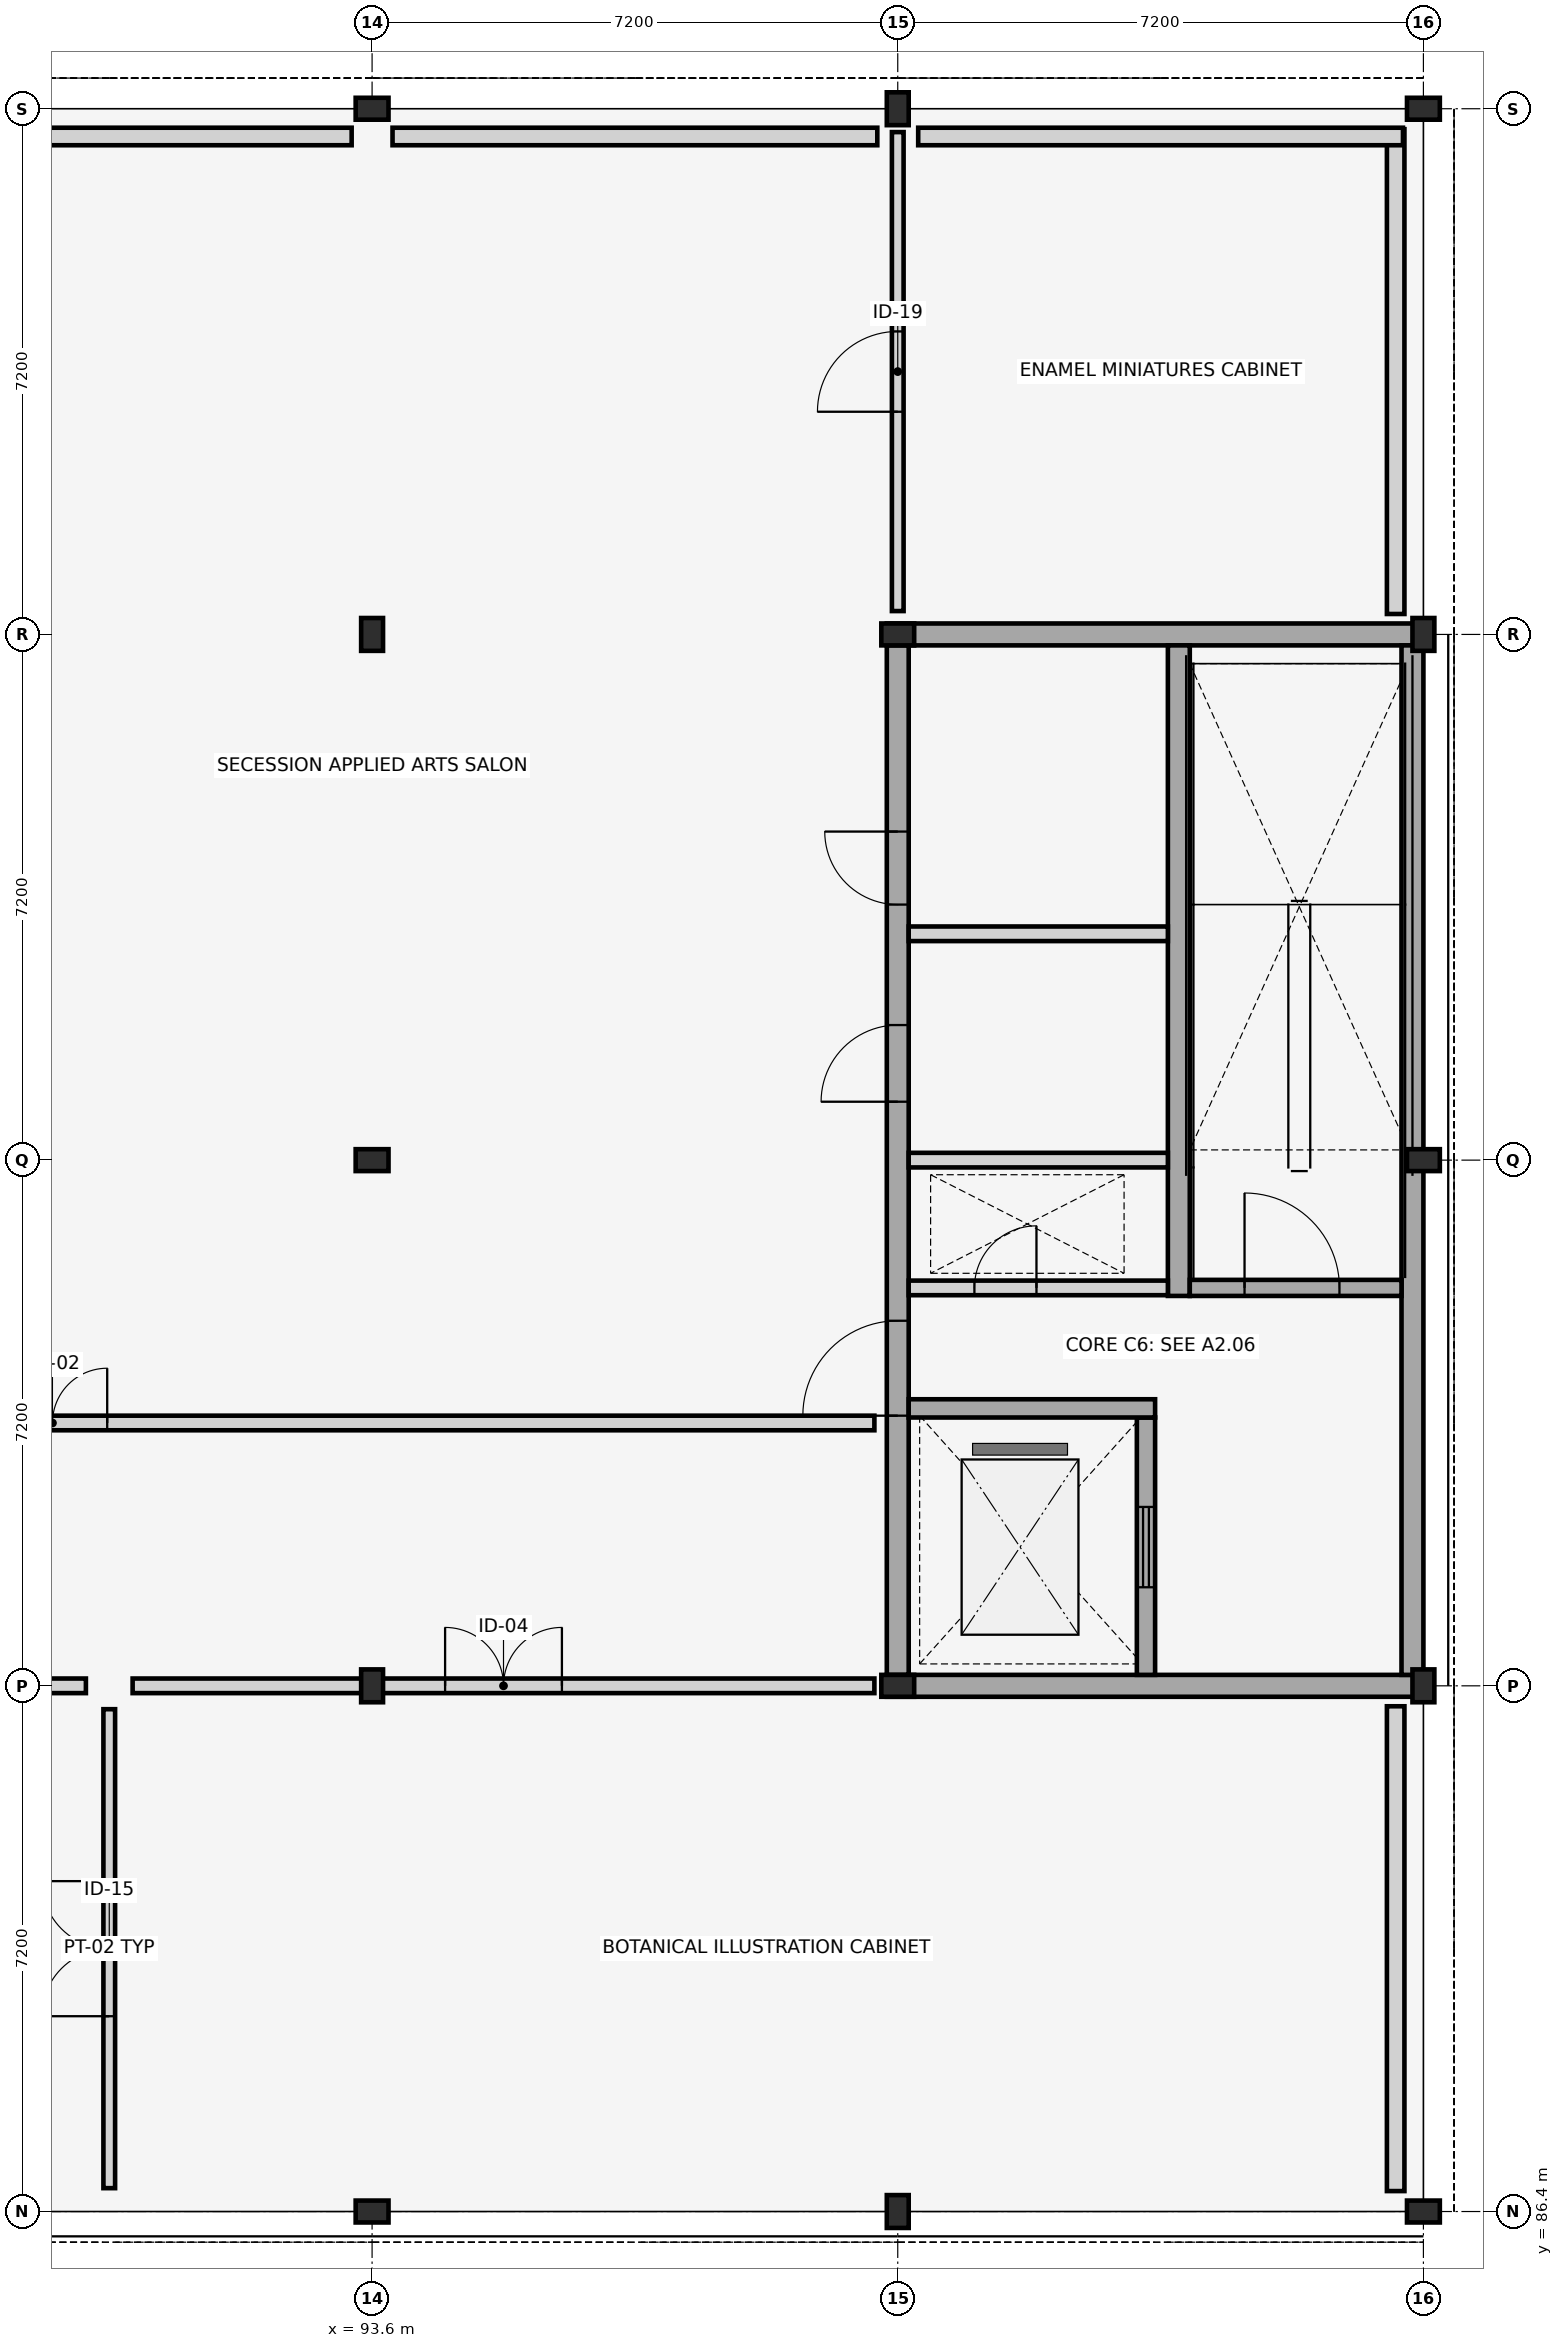
"""IFC4 building model, lengths in metres.
Left out: names, types, materials, properties, quantities, classifications, styles, units other than length and angle.
Written with IfcOpenShell. Run it as: python <this file> out.ifc"""

import sys

from ifc_helpers import new_model, si_unit, direction, frame, frame_2d, origin, origin_2d, place, context, subcontext, project, spatial, rectangle, i_section, extrude, element, fill, save


model = new_model("IFC4")
c1 = context("Model", 3, precision=1e-05, world=origin(), true_north=direction((0.0, 1.0)))
c2 = subcontext(c1, "Body", "Model", "MODEL_VIEW")
j1 = project(units=[si_unit("LENGTHUNIT", "METRE"), si_unit("PLANEANGLEUNIT", "RADIAN")], contexts=[c1])
p1 = place(None, origin())
s1 = spatial("IfcSite", under=j1, at=p1, CompositionType="ELEMENT")
p2 = place(p1, origin())
s2 = spatial("IfcBuilding", under=s1, at=p2, CompositionType="ELEMENT")
p3 = place(p2, frame((0.0, 0.0, 4.5)))
s3 = spatial("IfcBuildingStorey", under=s2, at=p3, CompositionType="ELEMENT", Elevation=4.5)
for number, where, z_axis, x_axis in (
    (1, (93.6, 86.4, 0.0), (0.0, 0.0, 1.0), (0.0, 1.0, 0.0)),
    (2, (93.6, 93.6, 0.0), (0.0, 0.0, 1.0), (1.0, 0.0, 0.0)),
    (3, (93.6, 100.8, 0.0), (0.0, 0.0, 1.0), (0.0, 1.0, 0.0)),
    (4, (93.6, 108.0, 0.0), (0.0, 0.0, 1.0), (1.0, 0.0, 0.0)),
    (5, (93.6, 115.2, 0.0), (0.0, 0.0, 1.0), (0.0, 1.0, 0.0)),
    (6, (100.8, 86.4, 0.0), (0.0, 0.0, 1.0), (1.0, 0.0, 0.0)),
    (7, (100.8, 93.6, 0.0), (0.0, 0.0, 1.0), (0.0, 1.0, 0.0)),
    (8, (100.8, 108.0, 0.0), (0.0, 0.0, 1.0), (0.0, 1.0, 0.0)),
    (9, (100.8, 115.2, 0.0), (0.0, 0.0, 1.0), (1.0, 0.0, 0.0)),
    (10, (108.0, 86.4, 0.0), (0.0, 0.0, 1.0), (0.0, 1.0, 0.0)),
    (11, (108.0, 93.6, 0.0), (0.0, 0.0, 1.0), (1.0, 0.0, 0.0)),
    (12, (108.0, 100.8, 0.0), (0.0, 0.0, 1.0), (0.0, 1.0, 0.0)),
    (13, (108.0, 108.0, 0.0), (0.0, 0.0, 1.0), (1.0, 0.0, 0.0)),
    (14, (108.0, 115.2, 0.0), (0.0, 0.0, 1.0), (0.0, 1.0, 0.0)),
):
    element("IfcColumn", number, at=place(p3, frame(where, z_axis=z_axis, x_axis=x_axis)), inside=s3, PredefinedType="COLUMN", context=c2, shape_type="SweptSolid", body=[
        extrude(i_section(OverallWidth=0.3, OverallDepth=0.45, WebThickness=0.014, FlangeThickness=0.026, FilletRadius=0.027, at=origin_2d()), origin(), (0.0, 0.0, 1.0), 4.2),
    ])
p4 = place(p3, frame((107.62, 86.68, 0.0), z_axis=(0.0, 0.0, 1.0), x_axis=(0.0, 1.0, 0.0)))
e15 = element("IfcWall", 15, at=p4, inside=s3, PredefinedType="STANDARD", context=c2, shape_type="SweptSolid", body=[
    extrude(rectangle(XDim=6.64, YDim=0.24, at=frame_2d((3.32, 0.0))), origin(), (0.0, 0.0, 1.0), 3.58),
])
for number, where, z_axis, x_axis in (
    (16, (107.62, 108.28, 0.0), (0.0, 0.0, 1.0), (0.0, 1.0, 0.0)),
    (17, (107.72, 114.82, 0.0), (0.0, 0.0, 1.0), (-1.0, 0.0, 0.0)),
):
    element("IfcWall", number, at=place(p3, frame(where, z_axis=z_axis, x_axis=x_axis)), inside=s3, PredefinedType="STANDARD", context=c2, shape_type="SweptSolid", body=[
        extrude(rectangle(XDim=6.64, YDim=0.24, at=frame_2d((3.32, 0.0))), origin(), (0.0, 0.0, 1.0), 3.58),
    ])
for number, where, z_axis, x_axis in (
    (18, (100.52, 114.82, 0.0), (0.0, 0.0, 1.0), (-1.0, 0.0, 0.0)),
    (19, (93.32, 114.82, 0.0), (0.0, 0.0, 1.0), (-1.0, 0.0, 0.0)),
):
    element("IfcWall", number, at=place(p3, frame(where, z_axis=z_axis, x_axis=x_axis)), inside=s3, PredefinedType="STANDARD", context=c2, shape_type="SweptSolid", body=[
        extrude(rectangle(XDim=6.64, YDim=0.24, at=frame_2d((3.32, 0.0))), origin(), (0.0, 0.0, 1.0), 3.58),
    ])
for number, where, z_axis, x_axis in (
    (20, (100.65, 93.6, 0.0), (0.0, 0.0, 1.0), (1.0, 0.0, 0.0)),
    (21, (100.65, 108.0, 0.0), (0.0, 0.0, 1.0), (1.0, 0.0, 0.0)),
):
    element("IfcWall", number, at=place(p3, frame(where, z_axis=z_axis, x_axis=x_axis)), inside=s3, PredefinedType="SHEAR", context=c2, shape_type="SweptSolid", body=[
        extrude(rectangle(XDim=7.35, YDim=0.3, at=frame_2d((3.675, 0.0))), origin(), (0.0, 0.0, 1.0), 3.98),
    ])
p5 = place(p3, frame((107.85, 93.75, 0.0), z_axis=(0.0, 0.0, 1.0), x_axis=(0.0, 1.0, 0.0)))
e22 = element("IfcWall", 22, at=p5, inside=s3, PredefinedType="SHEAR", context=c2, shape_type="SweptSolid", body=[
    extrude(rectangle(XDim=14.1, YDim=0.3, at=frame_2d((7.05, 0.0))), origin(), (0.0, 0.0, 1.0), 3.98),
])
p6 = place(p3, frame((100.8, 93.75, 0.0), z_axis=(0.0, 0.0, 1.0), x_axis=(0.0, 1.0, 0.0)))
e23 = element("IfcWall", 23, at=p6, inside=s3, PredefinedType="SHEAR", context=c2, shape_type="SweptSolid", body=[
    extrude(rectangle(XDim=14.1, YDim=0.3, at=frame_2d((7.05, 0.0))), origin(), (0.0, 0.0, 1.0), 3.98),
])
p7 = place(p6, frame((3.55, 0.0, 0.0)))
e24 = element("IfcOpeningElement", 24, at=p7, cuts=e23, PredefinedType="OPENING", context=c2, shape_type="SweptSolid", body=[
    extrude(rectangle(XDim=1.3, YDim=2.2, at=frame_2d((0.65, 1.1))), frame((0.0, 0.16, 0.0), z_axis=(0.0, -1.0, 0.0), x_axis=(1.0, 0.0, 0.0)), (0.0, 0.0, 1.0), 0.32),
])
p8 = place(p6, frame((7.85, 0.0, 0.0)))
e25 = element("IfcOpeningElement", 25, at=p8, cuts=e23, PredefinedType="OPENING", context=c2, shape_type="SweptSolid", body=[
    extrude(rectangle(XDim=1.05, YDim=2.15, at=frame_2d((0.525, 1.075))), frame((0.0, 0.16, 0.0), z_axis=(0.0, -1.0, 0.0), x_axis=(1.0, 0.0, 0.0)), (0.0, 0.0, 1.0), 0.32),
])
p9 = place(p6, frame((10.55, 0.0, 0.0)))
e26 = element("IfcOpeningElement", 26, at=p9, cuts=e23, PredefinedType="OPENING", context=c2, shape_type="SweptSolid", body=[
    extrude(rectangle(XDim=1.0, YDim=2.15, at=frame_2d((0.5, 1.075))), frame((0.0, 0.16, 0.0), z_axis=(0.0, -1.0, 0.0), x_axis=(1.0, 0.0, 0.0)), (0.0, 0.0, 1.0), 0.32),
])
p10 = place(p3, frame((104.2, 93.75, 0.0), z_axis=(0.0, 0.0, 1.0), x_axis=(0.0, 1.0, 0.0)))
e27 = element("IfcWall", 27, at=p10, inside=s3, PredefinedType="SHEAR", context=c2, shape_type="SweptSolid", body=[
    extrude(rectangle(XDim=3.525, YDim=0.25, at=frame_2d((1.762, 0.0))), origin(), (0.0, 0.0, 1.0), 3.98),
])
p11 = place(p10, frame((1.2, 0.0, 0.0)))
e28 = element("IfcOpeningElement", 28, at=p11, cuts=e27, PredefinedType="OPENING", context=c2, shape_type="SweptSolid", body=[
    extrude(rectangle(XDim=1.1, YDim=2.15, at=frame_2d((0.55, 1.075))), frame((0.0, 0.135, 0.0), z_axis=(0.0, -1.0, 0.0), x_axis=(1.0, 0.0, 0.0)), (0.0, 0.0, 1.0), 0.27),
])
p12 = place(p3, frame((104.65, 98.94, 0.0), z_axis=(0.0, 0.0, 1.0), x_axis=(0.0, 1.0, 0.0)))
e29 = element("IfcWall", 29, at=p12, inside=s3, PredefinedType="SHEAR", context=c2, shape_type="SweptSolid", body=[
    extrude(rectangle(XDim=8.91, YDim=0.3, at=frame_2d((4.455, 0.0))), origin(), (0.0, 0.0, 1.0), 3.98),
])
p13 = place(p3, frame((100.95, 99.05, 0.0), z_axis=(0.0, 0.0, 1.0), x_axis=(1.0, 0.0, 0.0)))
e30 = element("IfcWall", 30, at=p13, inside=s3, PredefinedType="PLUMBINGWALL", context=c2, shape_type="SweptSolid", body=[
    extrude(rectangle(XDim=3.55, YDim=0.2, at=frame_2d((1.775, 0.0))), origin(), (0.0, 0.0, 1.0), 3.4),
])
p14 = place(p13, frame((0.9, 0.0, 0.0)))
e31 = element("IfcOpeningElement", 31, at=p14, cuts=e30, PredefinedType="OPENING", context=c2, shape_type="SweptSolid", body=[
    extrude(rectangle(XDim=0.85, YDim=2.05, at=frame_2d((0.425, 1.025))), frame((0.0, 0.11, 0.0), z_axis=(0.0, -1.0, 0.0), x_axis=(1.0, 0.0, 0.0)), (0.0, 0.0, 1.0), 0.22),
])
p15 = place(p3, frame((104.8, 99.05, 0.0), z_axis=(0.0, 0.0, 1.0), x_axis=(1.0, 0.0, 0.0)))
e32 = element("IfcWall", 32, at=p15, inside=s3, PredefinedType="SHEAR", context=c2, shape_type="SweptSolid", body=[
    extrude(rectangle(XDim=2.9, YDim=0.22, at=frame_2d((1.45, 0.0))), origin(), (0.0, 0.0, 1.0), 3.98),
])
p16 = place(p15, frame((0.75, 0.0, 0.0)))
e33 = element("IfcOpeningElement", 33, at=p16, cuts=e32, PredefinedType="OPENING", context=c2, shape_type="SweptSolid", body=[
    extrude(rectangle(XDim=1.3, YDim=2.2, at=frame_2d((0.65, 1.1))), frame((0.0, 0.12, 0.0), z_axis=(0.0, -1.0, 0.0), x_axis=(1.0, 0.0, 0.0)), (0.0, 0.0, 1.0), 0.24),
])
p17 = place(p3, frame((100.95, 97.4, 0.0), z_axis=(0.0, 0.0, 1.0), x_axis=(1.0, 0.0, 0.0)))
e34 = element("IfcWall", 34, at=p17, inside=s3, PredefinedType="SHEAR", context=c2, shape_type="SweptSolid", body=[
    extrude(rectangle(XDim=3.375, YDim=0.25, at=frame_2d((1.688, 0.0))), origin(), (0.0, 0.0, 1.0), 3.98),
])
for number, where, z_axis, x_axis in (
    (35, (100.95, 100.8, 0.0), (0.0, 0.0, 1.0), (1.0, 0.0, 0.0)),
    (36, (100.95, 103.9, 0.0), (0.0, 0.0, 1.0), (1.0, 0.0, 0.0)),
):
    element("IfcWall", number, at=place(p3, frame(where, z_axis=z_axis, x_axis=x_axis)), inside=s3, PredefinedType="PLUMBINGWALL", context=c2, shape_type="SweptSolid", body=[
        extrude(rectangle(XDim=3.55, YDim=0.2, at=frame_2d((1.775, 0.0))), origin(), (0.0, 0.0, 1.0), 3.4),
    ])
p18 = place(p3, frame((65.12, 93.6, 0.0), z_axis=(0.0, 0.0, 1.0), x_axis=(1.0, 0.0, 0.0)))
e37 = element("IfcWall", 37, at=p18, inside=s3, PredefinedType="PARTITIONING", context=c2, shape_type="SweptSolid", body=[
    extrude(rectangle(XDim=24.56, YDim=0.2, at=frame_2d((12.28, 0.0))), origin(), (0.0, 0.0, 1.0), 3.15),
])
p19 = place(p18, frame((11.53, 0.0, 0.0)))
e38 = element("IfcOpeningElement", 38, at=p19, cuts=e37, PredefinedType="OPENING", context=c2, shape_type="SweptSolid", body=[
    extrude(rectangle(XDim=1.5, YDim=2.25, at=frame_2d((0.75, 1.125))), frame((0.0, 0.11, 0.0), z_axis=(0.0, -1.0, 0.0), x_axis=(1.0, 0.0, 0.0)), (0.0, 0.0, 1.0), 0.22),
])
p20 = place(p3, frame((90.32, 93.6, 0.0), z_axis=(0.0, 0.0, 1.0), x_axis=(1.0, 0.0, 0.0)))
e39 = element("IfcWall", 39, at=p20, inside=s3, PredefinedType="PARTITIONING", context=c2, shape_type="SweptSolid", body=[
    extrude(rectangle(XDim=10.16, YDim=0.2, at=frame_2d((5.08, 0.0))), origin(), (0.0, 0.0, 1.0), 3.15),
])
p21 = place(p20, frame((4.28, 0.0, 0.0)))
e40 = element("IfcOpeningElement", 40, at=p21, cuts=e39, PredefinedType="OPENING", context=c2, shape_type="SweptSolid", body=[
    extrude(rectangle(XDim=1.6, YDim=2.35, at=frame_2d((0.8, 1.175))), frame((0.0, 0.11, 0.0), z_axis=(0.0, -1.0, 0.0), x_axis=(1.0, 0.0, 0.0)), (0.0, 0.0, 1.0), 0.22),
])
p22 = place(p3, frame((86.72, 97.2, 0.0), z_axis=(0.0, 0.0, 1.0), x_axis=(1.0, 0.0, 0.0)))
e41 = element("IfcWall", 41, at=p22, inside=s3, PredefinedType="PARTITIONING", context=c2, shape_type="SweptSolid", body=[
    extrude(rectangle(XDim=13.76, YDim=0.2, at=frame_2d((6.88, 0.0))), origin(), (0.0, 0.0, 1.0), 3.15),
])
p23 = place(p22, frame((1.752, 0.0, 0.0)))
e42 = element("IfcOpeningElement", 42, at=p23, cuts=e41, PredefinedType="OPENING", context=c2, shape_type="SweptSolid", body=[
    extrude(rectangle(XDim=1.5, YDim=2.25, at=frame_2d((0.75, 1.125))), frame((0.0, 0.11, 0.0), z_axis=(0.0, -1.0, 0.0), x_axis=(1.0, 0.0, 0.0)), (0.0, 0.0, 1.0), 0.22),
])
p24 = place(p3, frame((90.0, 86.72, 0.0), z_axis=(0.0, 0.0, 1.0), x_axis=(0.0, 1.0, 0.0)))
e43 = element("IfcWall", 43, at=p24, inside=s3, PredefinedType="PARTITIONING", context=c2, shape_type="SweptSolid", body=[
    extrude(rectangle(XDim=6.56, YDim=0.16, at=frame_2d((3.28, 0.0))), origin(), (0.0, 0.0, 1.0), 3.15),
])
p25 = place(p24, frame((2.355, 0.0, 0.0)))
e44 = element("IfcOpeningElement", 44, at=p25, cuts=e43, PredefinedType="OPENING", context=c2, shape_type="SweptSolid", body=[
    extrude(rectangle(XDim=1.85, YDim=2.5, at=frame_2d((0.925, 1.25))), frame((0.0, 0.09, 0.0), z_axis=(0.0, -1.0, 0.0), x_axis=(1.0, 0.0, 0.0)), (0.0, 0.0, 1.0), 0.18),
])
p26 = place(p3, frame((100.8, 108.32, 0.0), z_axis=(0.0, 0.0, 1.0), x_axis=(0.0, 1.0, 0.0)))
e45 = element("IfcWall", 45, at=p26, inside=s3, PredefinedType="PARTITIONING", context=c2, shape_type="SweptSolid", body=[
    extrude(rectangle(XDim=6.56, YDim=0.16, at=frame_2d((3.28, 0.0))), origin(), (0.0, 0.0, 1.0), 3.15),
])
p27 = place(p26, frame((2.73, 0.0, 0.0)))
e46 = element("IfcOpeningElement", 46, at=p27, cuts=e45, PredefinedType="OPENING", context=c2, shape_type="SweptSolid", body=[
    extrude(rectangle(XDim=1.1, YDim=2.35, at=frame_2d((0.55, 1.175))), frame((0.0, 0.09, 0.0), z_axis=(0.0, -1.0, 0.0), x_axis=(1.0, 0.0, 0.0)), (0.0, 0.0, 1.0), 0.18),
])
p28 = place(p7, origin())
e47 = element("IfcDoor", 47, at=p28, inside=s3, OperationType="SINGLE_SWING_LEFT", PredefinedType="DOOR", context=c2, shape_type="SweptSolid", body=[
    extrude(rectangle(XDim=1.3, YDim=2.2, at=frame_2d((0.65, 1.1))), frame((0.0, 0.025, 0.0), z_axis=(0.0, -1.0, 0.0), x_axis=(1.0, 0.0, 0.0)), (0.0, 0.0, 1.0), 0.05),
])
fill(e24, e47)
p29 = place(p8, origin())
e48 = element("IfcDoor", 48, at=p29, inside=s3, OperationType="SINGLE_SWING_LEFT", PredefinedType="DOOR", context=c2, shape_type="SweptSolid", body=[
    extrude(rectangle(XDim=1.05, YDim=2.15, at=frame_2d((0.525, 1.075))), frame((0.0, 0.025, 0.0), z_axis=(0.0, -1.0, 0.0), x_axis=(1.0, 0.0, 0.0)), (0.0, 0.0, 1.0), 0.05),
])
fill(e25, e48)
p30 = place(p9, origin())
e49 = element("IfcDoor", 49, at=p30, inside=s3, OperationType="SINGLE_SWING_RIGHT", PredefinedType="DOOR", context=c2, shape_type="SweptSolid", body=[
    extrude(rectangle(XDim=1.0, YDim=2.15, at=frame_2d((0.5, 1.075))), frame((0.0, 0.025, 0.0), z_axis=(0.0, -1.0, 0.0), x_axis=(1.0, 0.0, 0.0)), (0.0, 0.0, 1.0), 0.05),
])
fill(e26, e49)
p31 = place(p11, origin())
e50 = element("IfcDoor", 50, at=p31, inside=s3, OperationType="SLIDING_TO_LEFT", PredefinedType="DOOR", context=c2, shape_type="SweptSolid", body=[
    extrude(rectangle(XDim=1.1, YDim=2.15, at=frame_2d((0.55, 1.075))), frame((0.0, 0.025, 0.0), z_axis=(0.0, -1.0, 0.0), x_axis=(1.0, 0.0, 0.0)), (0.0, 0.0, 1.0), 0.05),
])
fill(e28, e50)
p32 = place(p14, origin())
e51 = element("IfcDoor", 51, at=p32, inside=s3, OperationType="SINGLE_SWING_RIGHT", PredefinedType="TRAPDOOR", context=c2, shape_type="SweptSolid", body=[
    extrude(rectangle(XDim=0.85, YDim=2.05, at=frame_2d((0.425, 1.025))), frame((0.0, 0.025, 0.0), z_axis=(0.0, -1.0, 0.0), x_axis=(1.0, 0.0, 0.0)), (0.0, 0.0, 1.0), 0.05),
])
fill(e31, e51)
p33 = place(p16, origin())
e52 = element("IfcDoor", 52, at=p33, inside=s3, OperationType="SINGLE_SWING_LEFT", PredefinedType="DOOR", context=c2, shape_type="SweptSolid", body=[
    extrude(rectangle(XDim=1.3, YDim=2.2, at=frame_2d((0.65, 1.1))), frame((0.0, 0.025, 0.0), z_axis=(0.0, -1.0, 0.0), x_axis=(1.0, 0.0, 0.0)), (0.0, 0.0, 1.0), 0.05),
])
fill(e33, e52)
p34 = place(p21, origin())
e53 = element("IfcDoor", 53, at=p34, inside=s3, OperationType="DOUBLE_DOOR_SINGLE_SWING", PredefinedType="DOOR", context=c2, shape_type="SweptSolid", body=[
    extrude(rectangle(XDim=1.6, YDim=2.35, at=frame_2d((0.8, 1.175))), frame((0.0, 0.025, 0.0), z_axis=(0.0, -1.0, 0.0), x_axis=(1.0, 0.0, 0.0)), (0.0, 0.0, 1.0), 0.05),
])
fill(e40, e53)
p35 = place(p23, origin())
e54 = element("IfcDoor", 54, at=p35, inside=s3, OperationType="DOUBLE_DOOR_SINGLE_SWING", PredefinedType="DOOR", context=c2, shape_type="SweptSolid", body=[
    extrude(rectangle(XDim=1.5, YDim=2.25, at=frame_2d((0.75, 1.125))), frame((0.0, 0.025, 0.0), z_axis=(0.0, -1.0, 0.0), x_axis=(1.0, 0.0, 0.0)), (0.0, 0.0, 1.0), 0.05),
])
fill(e42, e54)
p36 = place(p25, origin())
e55 = element("IfcDoor", 55, at=p36, inside=s3, OperationType="DOUBLE_DOOR_SINGLE_SWING", PredefinedType="DOOR", context=c2, shape_type="SweptSolid", body=[
    extrude(rectangle(XDim=1.85, YDim=2.5, at=frame_2d((0.925, 1.25))), frame((0.0, 0.025, 0.0), z_axis=(0.0, -1.0, 0.0), x_axis=(1.0, 0.0, 0.0)), (0.0, 0.0, 1.0), 0.05),
])
fill(e44, e55)
p37 = place(p27, origin())
e56 = element("IfcDoor", 56, at=p37, inside=s3, OperationType="SINGLE_SWING_LEFT", PredefinedType="DOOR", context=c2, shape_type="SweptSolid", body=[
    extrude(rectangle(XDim=1.1, YDim=2.35, at=frame_2d((0.55, 1.175))), frame((0.0, 0.025, 0.0), z_axis=(0.0, -1.0, 0.0), x_axis=(1.0, 0.0, 0.0)), (0.0, 0.0, 1.0), 0.05),
])
fill(e46, e56)
save(model, sys.argv[1])
